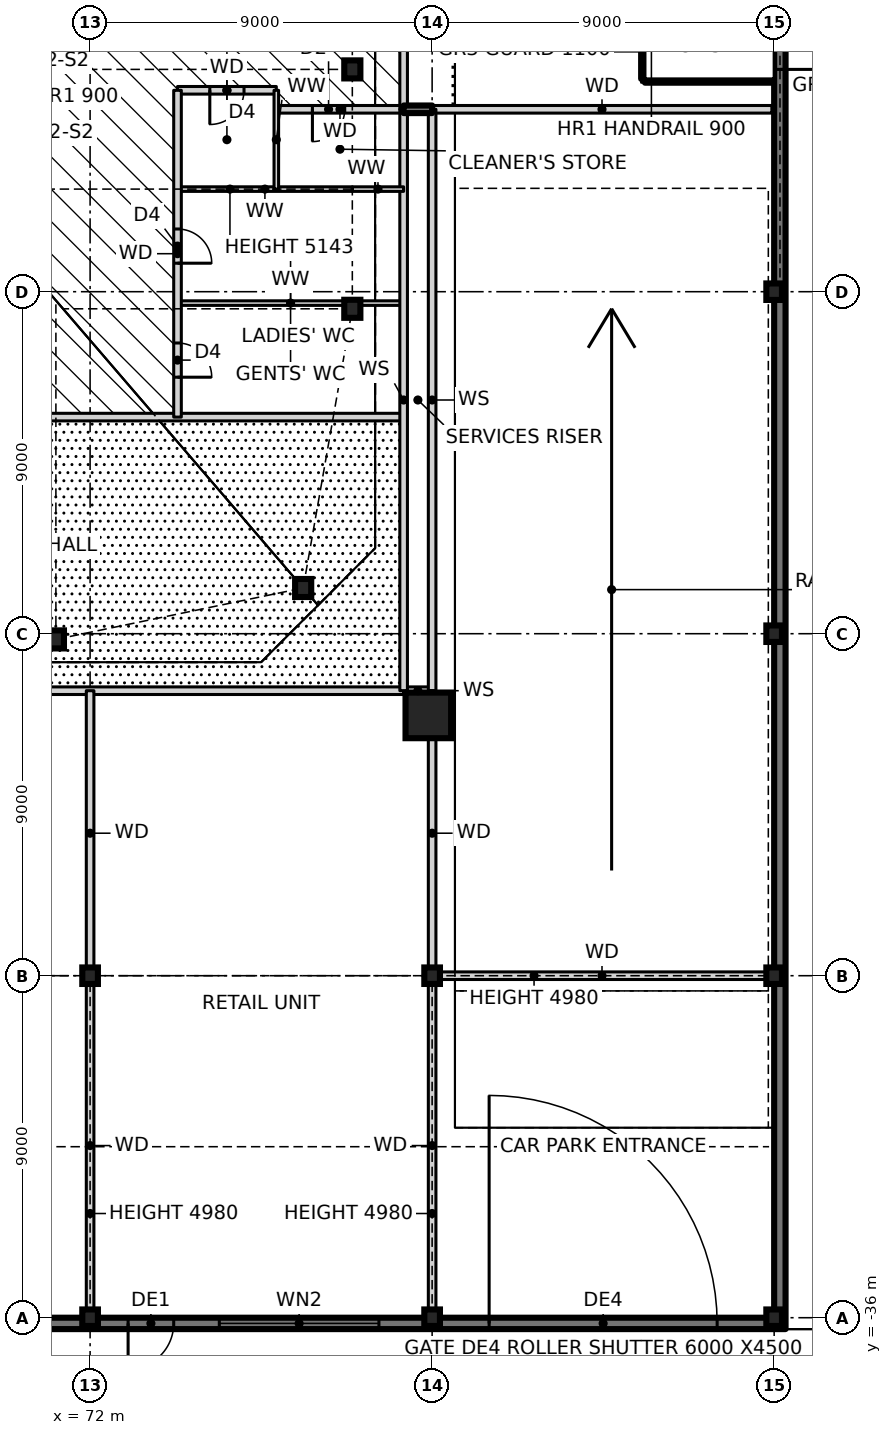
"""IFC4 building model, lengths in metres.
Left out: names, types, materials, properties, quantities, classifications, styles, units other than length and angle.
Written with IfcOpenShell. Run it as: python <this file> out.ifc"""

import sys

from ifc_helpers import new_model, si_unit, direction, frame, frame_2d, origin, origin_2d, place, context, subcontext, project, spatial, rectangle, hollow_rectangle, i_section, extrude, element, fill, save


model = new_model("IFC4")
c1 = context("Model", 3, precision=1e-05, world=origin(), true_north=direction((0.0, 1.0)))
c2 = subcontext(c1, "Body", "Model", "MODEL_VIEW")
j1 = project(units=[si_unit("LENGTHUNIT", "METRE"), si_unit("PLANEANGLEUNIT", "RADIAN")], contexts=[c1])
p1 = place(None, origin())
s1 = spatial("IfcSite", under=j1, at=p1, CompositionType="ELEMENT")
p2 = place(p1, origin())
s2 = spatial("IfcBuilding", under=s1, at=p2, CompositionType="ELEMENT")
p3 = place(p2, origin())
s3 = spatial("IfcBuildingStorey", under=s2, at=p3, CompositionType="ELEMENT", Elevation=0.0)
for number, where, z_axis, x_axis in (
    (1, (71.1, -18.15, 0.0), (0.0, 0.0, 1.0), (1.0, 0.0, 0.0)),
    (2, (77.606, -16.797, 0.0), (0.0, 0.0, 1.0), (1.0, 0.0, 0.0)),
    (3, (78.9, -9.45, 0.0), (0.0, 0.0, 1.0), (1.0, 0.0, 0.0)),
    (4, (78.9, -3.15, 0.0), (0.0, 0.0, 1.0), (1.0, 0.0, 0.0)),
):
    element("IfcColumn", number, at=place(p3, frame(where, z_axis=z_axis, x_axis=x_axis)), inside=s3, PredefinedType="COLUMN", context=c2, shape_type="SweptSolid", body=[
        extrude(i_section(OverallWidth=0.424, OverallDepth=0.475, WebThickness=0.048, FlangeThickness=0.077, at=origin_2d()), origin(), (0.0, 0.0, 1.0), 6.0),
    ])
p4 = place(p3, frame((80.9, -20.15, 0.0), z_axis=(0.0, 0.0, 1.0), x_axis=(1.0, 0.0, 0.0)))
e5 = element("IfcColumn", 5, at=p4, inside=s3, PredefinedType="COLUMN", context=c2, shape_type="SweptSolid", body=[
    extrude(hollow_rectangle(XDim=1.2, YDim=1.2, WallThickness=0.07, at=origin_2d()), origin(), (0.0, 0.0, 1.0), 6.0),
])
for number, where, z_axis, x_axis in (
    (6, (72.0, -36.0, 0.0), (0.0, 0.0, 1.0), (1.0, 0.0, 0.0)),
    (7, (72.0, -27.0, 0.0), (0.0, 0.0, 1.0), (1.0, 0.0, 0.0)),
    (8, (81.0, -36.0, 0.0), (0.0, 0.0, 1.0), (1.0, 0.0, 0.0)),
    (9, (81.0, -27.0, 0.0), (0.0, 0.0, 1.0), (1.0, 0.0, 0.0)),
    (10, (90.0, -36.0, 0.0), (0.0, 0.0, 1.0), (1.0, 0.0, 0.0)),
    (11, (90.0, -27.0, 0.0), (0.0, 0.0, 1.0), (1.0, 0.0, 0.0)),
    (12, (90.0, -18.0, 0.0), (0.0, 0.0, 1.0), (1.0, 0.0, 0.0)),
    (13, (90.0, -9.0, 0.0), (0.0, 0.0, 1.0), (1.0, 0.0, 0.0)),
):
    element("IfcColumn", number, at=place(p3, frame(where, z_axis=z_axis, x_axis=x_axis)), inside=s3, PredefinedType="COLUMN", context=c2, shape_type="SweptSolid", body=[
        extrude(i_section(OverallWidth=0.411, OverallDepth=0.434, WebThickness=0.036, FlangeThickness=0.057, at=origin_2d()), origin(), (0.0, 0.0, 1.0), 6.0),
    ])
p5 = place(p3, frame((63.0, -36.15, -0.25), z_axis=(0.0, 0.0, 1.0), x_axis=(1.0, 0.0, 0.0)))
e14 = element("IfcWall", 14, at=p5, inside=s3, PredefinedType="SOLIDWALL", context=c2, shape_type="SweptSolid", body=[
    extrude(rectangle(XDim=9.0, YDim=0.3, at=frame_2d((4.5, 0.0))), origin(), (0.0, 0.0, 1.0), 6.25),
])
p6 = place(p5, frame((1.0, 0.0, 0.25)))
e15 = element("IfcOpeningElement", 15, at=p6, cuts=e14, PredefinedType="OPENING", context=c2, shape_type="SweptSolid", body=[
    extrude(rectangle(XDim=1.2, YDim=2.4, at=frame_2d((0.6, 1.2))), frame((0.0, 0.16, 0.0), z_axis=(0.0, -1.0, 0.0), x_axis=(1.0, 0.0, 0.0)), (0.0, 0.0, 1.0), 0.32),
])
p7 = place(p5, frame((3.4, 0.0, 0.85)))
e16 = element("IfcOpeningElement", 16, at=p7, cuts=e14, PredefinedType="OPENING", context=c2, shape_type="SweptSolid", body=[
    extrude(rectangle(XDim=4.2, YDim=3.6, at=frame_2d((2.1, 1.8))), frame((0.0, 0.16, 0.0), z_axis=(0.0, -1.0, 0.0), x_axis=(1.0, 0.0, 0.0)), (0.0, 0.0, 1.0), 0.32),
])
p8 = place(p3, frame((72.0, -36.15, -0.25), z_axis=(0.0, 0.0, 1.0), x_axis=(1.0, 0.0, 0.0)))
e17 = element("IfcWall", 17, at=p8, inside=s3, PredefinedType="SOLIDWALL", context=c2, shape_type="SweptSolid", body=[
    extrude(rectangle(XDim=9.0, YDim=0.3, at=frame_2d((4.5, 0.0))), origin(), (0.0, 0.0, 1.0), 6.25),
])
p9 = place(p8, frame((1.0, 0.0, 0.25)))
e18 = element("IfcOpeningElement", 18, at=p9, cuts=e17, PredefinedType="OPENING", context=c2, shape_type="SweptSolid", body=[
    extrude(rectangle(XDim=1.2, YDim=2.4, at=frame_2d((0.6, 1.2))), frame((0.0, 0.16, 0.0), z_axis=(0.0, -1.0, 0.0), x_axis=(1.0, 0.0, 0.0)), (0.0, 0.0, 1.0), 0.32),
])
p10 = place(p8, frame((3.4, 0.0, 0.85)))
e19 = element("IfcOpeningElement", 19, at=p10, cuts=e17, PredefinedType="OPENING", context=c2, shape_type="SweptSolid", body=[
    extrude(rectangle(XDim=4.2, YDim=3.6, at=frame_2d((2.1, 1.8))), frame((0.0, 0.16, 0.0), z_axis=(0.0, -1.0, 0.0), x_axis=(1.0, 0.0, 0.0)), (0.0, 0.0, 1.0), 0.32),
])
p11 = place(p3, frame((81.0, -36.15, -0.25), z_axis=(0.0, 0.0, 1.0), x_axis=(1.0, 0.0, 0.0)))
e20 = element("IfcWall", 20, at=p11, inside=s3, PredefinedType="SOLIDWALL", context=c2, shape_type="SweptSolid", body=[
    extrude(rectangle(XDim=9.0, YDim=0.3, at=frame_2d((4.5, 0.0))), origin(), (0.0, 0.0, 1.0), 6.25),
])
p12 = place(p11, frame((1.5, 0.0, 0.25)))
e21 = element("IfcOpeningElement", 21, at=p12, cuts=e20, PredefinedType="OPENING", context=c2, shape_type="SweptSolid", body=[
    extrude(rectangle(XDim=6.0, YDim=4.5, at=frame_2d((3.0, 2.25))), frame((0.0, 0.16, 0.0), z_axis=(0.0, -1.0, 0.0), x_axis=(1.0, 0.0, 0.0)), (0.0, 0.0, 1.0), 0.32),
])
p13 = place(p3, frame((90.15, -36.3, -0.25), z_axis=(0.0, 0.0, 1.0), x_axis=(0.0, 1.0, 0.0)))
e22 = element("IfcWall", 22, at=p13, inside=s3, PredefinedType="SOLIDWALL", context=c2, shape_type="SweptSolid", body=[
    extrude(rectangle(XDim=72.6, YDim=0.3, at=frame_2d((36.3, 0.0))), origin(), (0.0, 0.0, 1.0), 5.23),
])
p14 = place(p13, frame((33.15, 0.0, 0.25)))
e23 = element("IfcOpeningElement", 23, at=p14, cuts=e22, PredefinedType="OPENING", context=c2, shape_type="SweptSolid", body=[
    extrude(rectangle(XDim=1.2, YDim=2.4, at=frame_2d((0.6, 1.2))), frame((0.0, 0.16, 0.0), z_axis=(0.0, -1.0, 0.0), x_axis=(1.0, 0.0, 0.0)), (0.0, 0.0, 1.0), 0.32),
])
p15 = place(p13, frame((47.3, 0.0, 0.25)))
e24 = element("IfcOpeningElement", 24, at=p15, cuts=e22, PredefinedType="OPENING", context=c2, shape_type="SweptSolid", body=[
    extrude(rectangle(XDim=6.0, YDim=4.5, at=frame_2d((3.0, 2.25))), frame((0.0, 0.16, 0.0), z_axis=(0.0, -1.0, 0.0), x_axis=(1.0, 0.0, 0.0)), (0.0, 0.0, 1.0), 0.32),
])
p16 = place(p3, frame((81.0, -27.0, 0.0), z_axis=(0.0, 0.0, 1.0), x_axis=(1.0, 0.0, 0.0)))
e25 = element("IfcWall", 25, at=p16, inside=s3, PredefinedType="SOLIDWALL", context=c2, shape_type="SweptSolid", body=[
    extrude(rectangle(XDim=8.94, YDim=0.2, at=frame_2d((4.47, 0.0))), origin(), (0.0, 0.0, 1.0), 4.98),
])
p17 = place(p3, frame((54.0, -19.5, 0.0), z_axis=(0.0, 0.0, 1.0), x_axis=(1.0, 0.0, 0.0)))
e26 = element("IfcWall", 26, at=p17, inside=s3, PredefinedType="SOLIDWALL", context=c2, shape_type="SweptSolid", body=[
    extrude(rectangle(XDim=26.25, YDim=0.2, at=frame_2d((13.125, 0.0))), origin(), (0.0, 0.0, 1.0), 5.75),
])
p18 = place(p3, frame((80.25, -19.5, 0.0), z_axis=(0.0, 0.0, 1.0), x_axis=(1.0, 0.0, 0.0)))
e27 = element("IfcWall", 27, at=p18, inside=s3, PredefinedType="SOLIDWALL", context=c2, shape_type="SweptSolid", body=[
    extrude(rectangle(XDim=0.75, YDim=0.2, at=frame_2d((0.375, 0.0))), origin(), (0.0, 0.0, 1.0), 6.0),
])
p19 = place(p3, frame((54.0, -12.3, 0.0), z_axis=(0.0, 0.0, 1.0), x_axis=(1.0, 0.0, 0.0)))
e28 = element("IfcWall", 28, at=p19, inside=s3, PredefinedType="SOLIDWALL", context=c2, shape_type="SweptSolid", body=[
    extrude(rectangle(XDim=26.25, YDim=0.2, at=frame_2d((13.125, 0.0))), origin(), (0.0, 0.0, 1.0), 5.75),
])
p20 = place(p19, frame((9.25, 0.0, 0.0)))
e29 = element("IfcOpeningElement", 29, at=p20, cuts=e28, PredefinedType="OPENING", context=c2, shape_type="SweptSolid", body=[
    extrude(rectangle(XDim=1.8, YDim=2.1, at=frame_2d((0.9, 1.05))), frame((0.0, 0.11, 0.0), z_axis=(0.0, -1.0, 0.0), x_axis=(1.0, 0.0, 0.0)), (0.0, 0.0, 1.0), 0.22),
])
p21 = place(p19, frame((0.25, 0.0, 0.0)))
e30 = element("IfcOpeningElement", 30, at=p21, cuts=e28, PredefinedType="OPENING", context=c2, shape_type="SweptSolid", body=[
    extrude(rectangle(XDim=1.8, YDim=2.1, at=frame_2d((0.9, 1.05))), frame((0.0, 0.11, 0.0), z_axis=(0.0, -1.0, 0.0), x_axis=(1.0, 0.0, 0.0)), (0.0, 0.0, 1.0), 0.22),
])
p22 = place(p3, frame((74.3, -9.3, 0.0), z_axis=(0.0, 0.0, 1.0), x_axis=(1.0, 0.0, 0.0)))
e31 = element("IfcWall", 31, at=p22, inside=s3, PredefinedType="PARTITIONING", context=c2, shape_type="SweptSolid", body=[
    extrude(rectangle(XDim=5.95, YDim=0.12, at=frame_2d((2.975, 0.0))), origin(), (0.0, 0.0, 1.0), 5.75),
])
p23 = place(p3, frame((74.3, -6.3, 0.0), z_axis=(0.0, 0.0, 1.0), x_axis=(1.0, 0.0, 0.0)))
e32 = element("IfcWall", 32, at=p23, inside=s3, PredefinedType="PARTITIONING", context=c2, shape_type="SweptSolid", body=[
    extrude(rectangle(XDim=4.6, YDim=0.12, at=frame_2d((2.3, 0.0))), origin(), (0.0, 0.0, 1.0), 5.143),
])
p24 = place(p3, frame((76.9, -4.2, 0.0), z_axis=(0.0, 0.0, 1.0), x_axis=(1.0, 0.0, 0.0)))
e33 = element("IfcWall", 33, at=p24, inside=s3, PredefinedType="SOLIDWALL", context=c2, shape_type="SweptSolid", body=[
    extrude(rectangle(XDim=3.35, YDim=0.2, at=frame_2d((1.675, 0.0))), origin(), (0.0, 0.0, 1.0), 5.75),
])
p25 = place(p24, frame((0.95, 0.0, 0.0)))
e34 = element("IfcOpeningElement", 34, at=p25, cuts=e33, PredefinedType="OPENING", context=c2, shape_type="SweptSolid", body=[
    extrude(rectangle(XDim=0.85, YDim=2.1, at=frame_2d((0.425, 1.05))), frame((0.0, 0.11, 0.0), z_axis=(0.0, -1.0, 0.0), x_axis=(1.0, 0.0, 0.0)), (0.0, 0.0, 1.0), 0.22),
])
p26 = place(p3, frame((80.25, -4.2, -0.25), z_axis=(0.0, 0.0, 1.0), x_axis=(1.0, 0.0, 0.0)))
e35 = element("IfcWall", 35, at=p26, inside=s3, PredefinedType="SOLIDWALL", context=c2, shape_type="SweptSolid", body=[
    extrude(rectangle(XDim=0.75, YDim=0.2, at=frame_2d((0.375, 0.0))), origin(), (0.0, 0.0, 1.0), 6.25),
])
p27 = place(p3, frame((81.0, -4.2, 0.0), z_axis=(0.0, 0.0, 1.0), x_axis=(1.0, 0.0, 0.0)))
e36 = element("IfcWall", 36, at=p27, inside=s3, PredefinedType="SOLIDWALL", context=c2, shape_type="SweptSolid", body=[
    extrude(rectangle(XDim=8.94, YDim=0.2, at=frame_2d((4.47, 0.0))), origin(), (0.0, 0.0, 1.0), 5.75),
])
p28 = place(p3, frame((74.3, -3.7, 0.0), z_axis=(0.0, 0.0, 1.0), x_axis=(1.0, 0.0, 0.0)))
e37 = element("IfcWall", 37, at=p28, inside=s3, PredefinedType="SOLIDWALL", context=c2, shape_type="SweptSolid", body=[
    extrude(rectangle(XDim=2.6, YDim=0.2, at=frame_2d((1.3, 0.0))), origin(), (0.0, 0.0, 1.0), 5.75),
])
p29 = place(p28, frame((0.85, 0.0, 0.0)))
e38 = element("IfcOpeningElement", 38, at=p29, cuts=e37, PredefinedType="OPENING", context=c2, shape_type="SweptSolid", body=[
    extrude(rectangle(XDim=0.9, YDim=2.1, at=frame_2d((0.45, 1.05))), frame((0.0, 0.11, 0.0), z_axis=(0.0, -1.0, 0.0), x_axis=(1.0, 0.0, 0.0)), (0.0, 0.0, 1.0), 0.22),
])
p30 = place(p3, frame((86.6, -3.4, 0.0), z_axis=(0.0, 0.0, 1.0), x_axis=(1.0, 0.0, 0.0)))
e39 = element("IfcWall", 39, at=p30, inside=s3, PredefinedType="SOLIDWALL", context=c2, shape_type="SweptSolid", body=[
    extrude(rectangle(XDim=3.34, YDim=0.2, at=frame_2d((1.67, 0.0))), origin(), (0.0, 0.0, 1.0), 6.0),
])
p31 = place(p3, frame((86.6, -3.4, 0.0), z_axis=(0.0, 0.0, 1.0), x_axis=(0.0, 1.0, 0.0)))
e40 = element("IfcWall", 40, at=p31, inside=s3, PredefinedType="SOLIDWALL", context=c2, shape_type="SweptSolid", body=[
    extrude(rectangle(XDim=7.4, YDim=0.2, at=frame_2d((3.7, 0.0))), origin(), (0.0, 0.0, 1.0), 6.0),
])
p32 = place(p3, frame((81.0, -35.94, 0.0), z_axis=(0.0, 0.0, 1.0), x_axis=(0.0, 1.0, 0.0)))
e41 = element("IfcWall", 41, at=p32, inside=s3, PredefinedType="SOLIDWALL", context=c2, shape_type="SweptSolid", body=[
    extrude(rectangle(XDim=8.94, YDim=0.2, at=frame_2d((4.47, 0.0))), origin(), (0.0, 0.0, 1.0), 4.98),
])
for number, where, z_axis, x_axis in (
    (42, (81.0, -19.5, 0.0), (0.0, 0.0, 1.0), (0.0, 1.0, 0.0)),
    (43, (80.25, -19.5, 0.0), (0.0, 0.0, 1.0), (0.0, 1.0, 0.0)),
):
    element("IfcWall", number, at=place(p3, frame(where, z_axis=z_axis, x_axis=x_axis)), inside=s3, PredefinedType="SOLIDWALL", context=c2, shape_type="SweptSolid", body=[
        extrude(rectangle(XDim=15.3, YDim=0.2, at=frame_2d((7.65, 0.0))), origin(), (0.0, 0.0, 1.0), 6.0),
    ])
p33 = place(p3, frame((80.25, -4.2, 0.0), z_axis=(0.0, 0.0, 1.0), x_axis=(0.0, 1.0, 0.0)))
e44 = element("IfcWall", 44, at=p33, inside=s3, PredefinedType="SOLIDWALL", context=c2, shape_type="SweptSolid", body=[
    extrude(rectangle(XDim=40.14, YDim=0.2, at=frame_2d((20.07, 0.0))), origin(), (0.0, 0.0, 1.0), 5.75),
])
p34 = place(p33, frame((2.85, 0.0, 0.0)))
e45 = element("IfcOpeningElement", 45, at=p34, cuts=e44, PredefinedType="OPENING", context=c2, shape_type="SweptSolid", body=[
    extrude(rectangle(XDim=1.5, YDim=2.4, at=frame_2d((0.75, 1.2))), frame((0.0, 0.11, 0.0), z_axis=(0.0, -1.0, 0.0), x_axis=(1.0, 0.0, 0.0)), (0.0, 0.0, 1.0), 0.22),
])
p35 = place(p3, frame((76.9, -6.3, 0.0), z_axis=(0.0, 0.0, 1.0), x_axis=(0.0, 1.0, 0.0)))
e46 = element("IfcWall", 46, at=p35, inside=s3, PredefinedType="PARTITIONING", context=c2, shape_type="SweptSolid", body=[
    extrude(rectangle(XDim=2.6, YDim=0.12, at=frame_2d((1.3, 0.0))), origin(), (0.0, 0.0, 1.0), 5.75),
])
p36 = place(p3, frame((74.3, -12.3, 0.0), z_axis=(0.0, 0.0, 1.0), x_axis=(0.0, 1.0, 0.0)))
e47 = element("IfcWall", 47, at=p36, inside=s3, PredefinedType="SOLIDWALL", context=c2, shape_type="SweptSolid", body=[
    extrude(rectangle(XDim=8.6, YDim=0.2, at=frame_2d((4.3, 0.0))), origin(), (0.0, 0.0, 1.0), 5.75),
])
p37 = place(p36, frame((1.05, 0.0, 0.0)))
e48 = element("IfcOpeningElement", 48, at=p37, cuts=e47, PredefinedType="OPENING", context=c2, shape_type="SweptSolid", body=[
    extrude(rectangle(XDim=0.9, YDim=2.1, at=frame_2d((0.45, 1.05))), frame((0.0, 0.11, 0.0), z_axis=(0.0, -1.0, 0.0), x_axis=(1.0, 0.0, 0.0)), (0.0, 0.0, 1.0), 0.22),
])
p38 = place(p36, frame((4.05, 0.0, 0.0)))
e49 = element("IfcOpeningElement", 49, at=p38, cuts=e47, PredefinedType="OPENING", context=c2, shape_type="SweptSolid", body=[
    extrude(rectangle(XDim=0.9, YDim=2.1, at=frame_2d((0.45, 1.05))), frame((0.0, 0.11, 0.0), z_axis=(0.0, -1.0, 0.0), x_axis=(1.0, 0.0, 0.0)), (0.0, 0.0, 1.0), 0.22),
])
p39 = place(p3, frame((72.0, -35.94, 0.0), z_axis=(0.0, 0.0, 1.0), x_axis=(0.0, 1.0, 0.0)))
e50 = element("IfcWall", 50, at=p39, inside=s3, PredefinedType="SOLIDWALL", context=c2, shape_type="SweptSolid", body=[
    extrude(rectangle(XDim=8.94, YDim=0.2, at=frame_2d((4.47, 0.0))), origin(), (0.0, 0.0, 1.0), 4.98),
])
p40 = place(p3, frame((78.9, -6.3, 0.0), z_axis=(0.0, 0.0, 1.0), x_axis=(1.0, 0.0, 0.0)))
e51 = element("IfcWall", 51, at=p40, inside=s3, PredefinedType="PARTITIONING", context=c2, shape_type="SweptSolid", body=[
    extrude(rectangle(XDim=1.35, YDim=0.12, at=frame_2d((0.675, 0.0))), origin(), (0.0, 0.0, 1.0), 5.75),
])
for number, where, z_axis, x_axis in (
    (52, (81.0, -27.0, 0.0), (0.0, 0.0, 1.0), (0.0, 1.0, 0.0)),
    (53, (72.0, -27.0, 0.0), (0.0, 0.0, 1.0), (0.0, 1.0, 0.0)),
):
    element("IfcWall", number, at=place(p3, frame(where, z_axis=z_axis, x_axis=x_axis)), inside=s3, PredefinedType="SOLIDWALL", context=c2, shape_type="SweptSolid", body=[
        extrude(rectangle(XDim=7.5, YDim=0.2, at=frame_2d((3.75, 0.0))), origin(), (0.0, 0.0, 1.0), 5.75),
    ])
p41 = place(p9, frame((1.2, 0.0, 0.0), z_axis=(0.0, 0.0, 1.0), x_axis=(-1.0, 0.0, 0.0)))
e54 = element("IfcDoor", 54, at=p41, inside=s3, OperationType="SINGLE_SWING_RIGHT", PredefinedType="DOOR", context=c2, shape_type="SweptSolid", body=[
    extrude(rectangle(XDim=1.2, YDim=2.4, at=frame_2d((0.6, 1.2))), frame((0.0, 0.025, 0.0), z_axis=(0.0, -1.0, 0.0), x_axis=(1.0, 0.0, 0.0)), (0.0, 0.0, 1.0), 0.05),
])
fill(e18, e54)
p42 = place(p10, origin())
e55 = element("IfcWindow", 55, at=p42, inside=s3, PartitioningType="SINGLE_PANEL", PredefinedType="WINDOW", context=c2, shape_type="SweptSolid", body=[
    extrude(rectangle(XDim=4.2, YDim=3.6, at=frame_2d((2.1, 1.8))), frame((0.0, 0.03, 0.0), z_axis=(0.0, -1.0, 0.0), x_axis=(1.0, 0.0, 0.0)), (0.0, 0.0, 1.0), 0.06),
])
fill(e19, e55)
p43 = place(p12, origin())
e56 = element("IfcDoor", 56, at=p43, inside=s3, OperationType="USERDEFINED", PredefinedType="GATE", context=c2, shape_type="SweptSolid", body=[
    extrude(rectangle(XDim=6.0, YDim=4.5, at=frame_2d((3.0, 2.25))), frame((0.0, 0.025, 0.0), z_axis=(0.0, -1.0, 0.0), x_axis=(1.0, 0.0, 0.0)), (0.0, 0.0, 1.0), 0.05),
])
fill(e21, e56)
p44 = place(p14, frame((1.2, 0.0, 0.0), z_axis=(0.0, 0.0, 1.0), x_axis=(-1.0, 0.0, 0.0)))
e57 = element("IfcDoor", 57, at=p44, inside=s3, OperationType="SINGLE_SWING_RIGHT", PredefinedType="DOOR", context=c2, shape_type="SweptSolid", body=[
    extrude(rectangle(XDim=1.2, YDim=2.4, at=frame_2d((0.6, 1.2))), frame((0.0, 0.025, 0.0), z_axis=(0.0, -1.0, 0.0), x_axis=(1.0, 0.0, 0.0)), (0.0, 0.0, 1.0), 0.05),
])
fill(e23, e57)
p45 = place(p37, frame((0.9, 0.0, 0.0), z_axis=(0.0, 0.0, 1.0), x_axis=(-1.0, 0.0, 0.0)))
e58 = element("IfcDoor", 58, at=p45, inside=s3, OperationType="SINGLE_SWING_RIGHT", PredefinedType="DOOR", context=c2, shape_type="SweptSolid", body=[
    extrude(rectangle(XDim=0.9, YDim=2.1, at=frame_2d((0.45, 1.05))), frame((0.0, 0.025, 0.0), z_axis=(0.0, -1.0, 0.0), x_axis=(1.0, 0.0, 0.0)), (0.0, 0.0, 1.0), 0.05),
])
fill(e48, e58)
p46 = place(p38, frame((0.9, 0.0, 0.0), z_axis=(0.0, 0.0, 1.0), x_axis=(-1.0, 0.0, 0.0)))
e59 = element("IfcDoor", 59, at=p46, inside=s3, OperationType="SINGLE_SWING_RIGHT", PredefinedType="DOOR", context=c2, shape_type="SweptSolid", body=[
    extrude(rectangle(XDim=0.9, YDim=2.1, at=frame_2d((0.45, 1.05))), frame((0.0, 0.025, 0.0), z_axis=(0.0, -1.0, 0.0), x_axis=(1.0, 0.0, 0.0)), (0.0, 0.0, 1.0), 0.05),
])
fill(e49, e59)
p47 = place(p29, frame((0.9, 0.0, 0.0), z_axis=(0.0, 0.0, 1.0), x_axis=(-1.0, 0.0, 0.0)))
e60 = element("IfcDoor", 60, at=p47, inside=s3, OperationType="SINGLE_SWING_RIGHT", PredefinedType="DOOR", context=c2, shape_type="SweptSolid", body=[
    extrude(rectangle(XDim=0.9, YDim=2.1, at=frame_2d((0.45, 1.05))), frame((0.0, 0.025, 0.0), z_axis=(0.0, -1.0, 0.0), x_axis=(1.0, 0.0, 0.0)), (0.0, 0.0, 1.0), 0.05),
])
fill(e38, e60)
p48 = place(p25, frame((0.85, 0.0, 0.0), z_axis=(0.0, 0.0, 1.0), x_axis=(-1.0, 0.0, 0.0)))
e61 = element("IfcDoor", 61, at=p48, inside=s3, OperationType="SINGLE_SWING_RIGHT", PredefinedType="DOOR", context=c2, shape_type="SweptSolid", body=[
    extrude(rectangle(XDim=0.85, YDim=2.1, at=frame_2d((0.425, 1.05))), frame((0.0, 0.025, 0.0), z_axis=(0.0, -1.0, 0.0), x_axis=(1.0, 0.0, 0.0)), (0.0, 0.0, 1.0), 0.05),
])
fill(e34, e61)
save(model, sys.argv[1])
